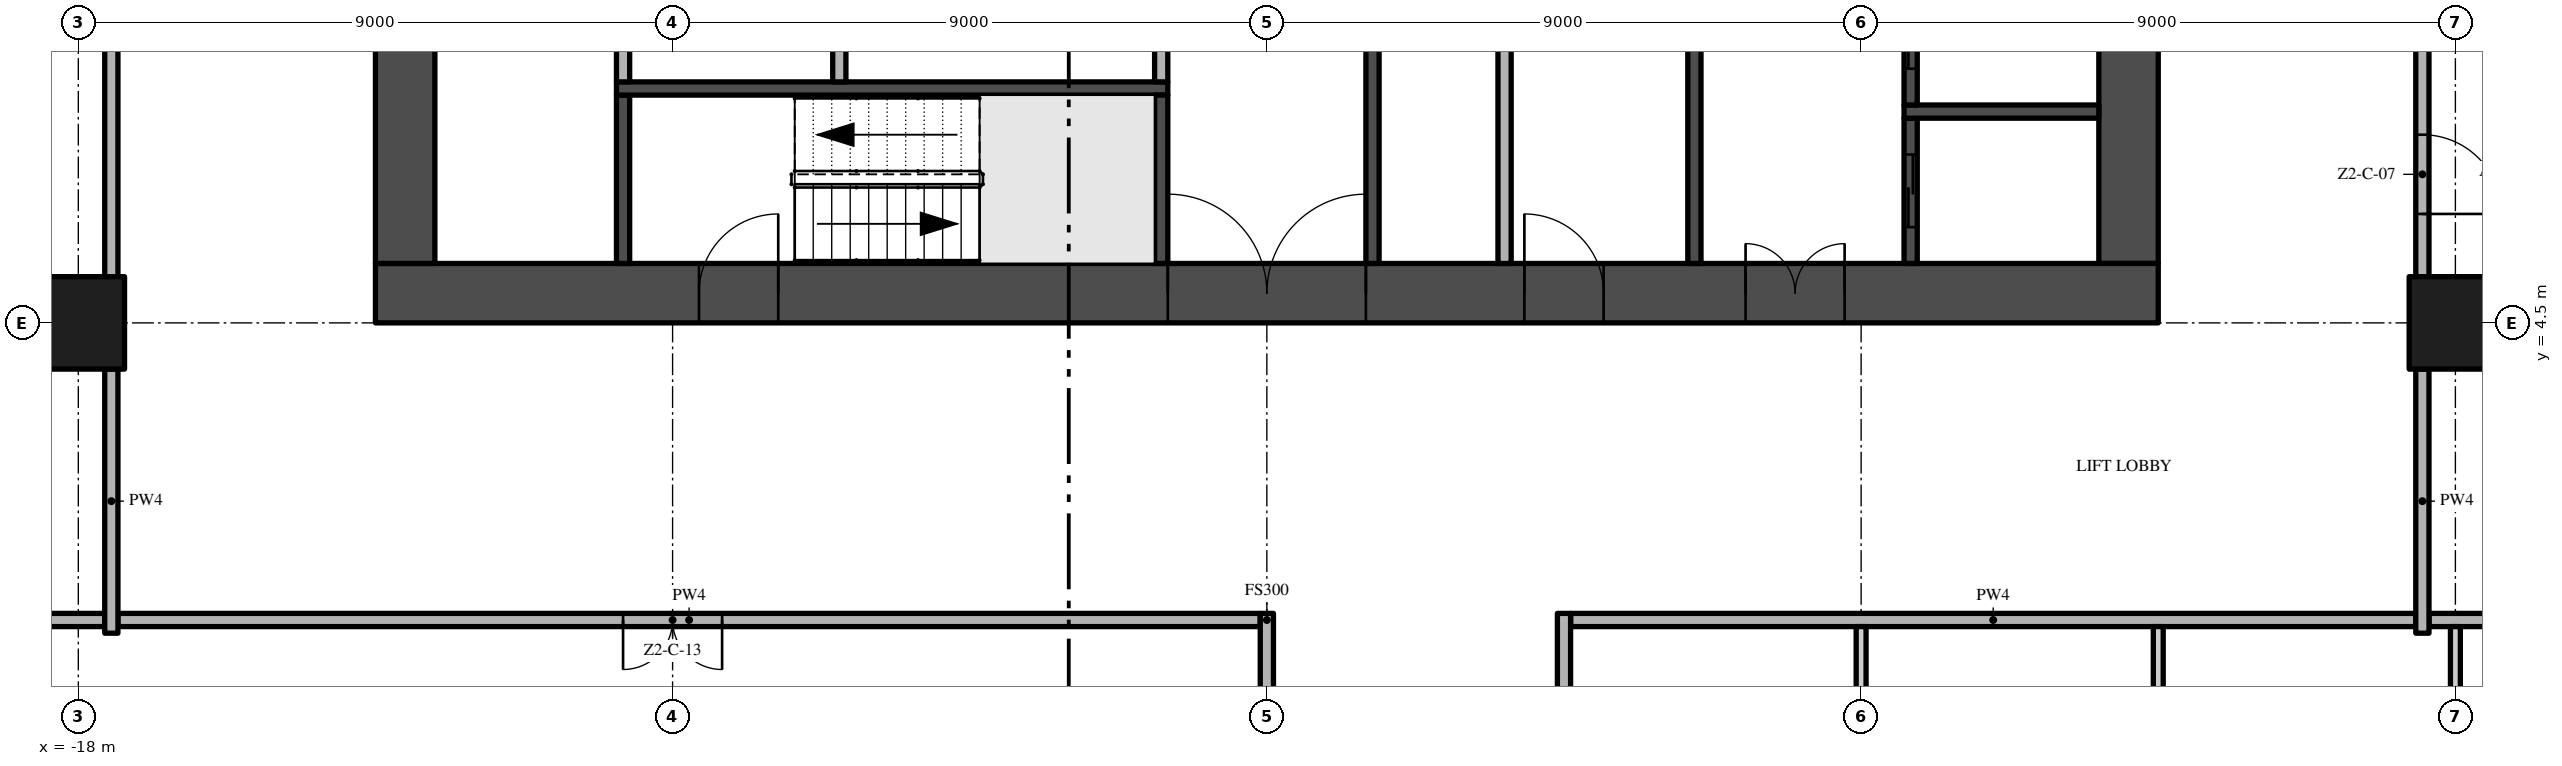
"""IFC4 building model, lengths in metres.
Left out: names, types, materials, properties, quantities, classifications, styles, units other than length and angle.
Written with IfcOpenShell. Run it as: python <this file> out.ifc"""

import sys

from ifc_helpers import new_model, si_unit, direction, frame, frame_2d, origin, origin_2d, place, context, subcontext, project, spatial, rectangle, extrude, element, fill, save


model = new_model("IFC4")
c1 = context("Model", 3, precision=1e-05, world=origin(), true_north=direction((0.0, 1.0)))
c2 = subcontext(c1, "Body", "Model", "MODEL_VIEW")
j1 = project(units=[si_unit("LENGTHUNIT", "METRE"), si_unit("PLANEANGLEUNIT", "RADIAN")], contexts=[c1])
p1 = place(None, origin())
s1 = spatial("IfcSite", under=j1, at=p1, CompositionType="ELEMENT")
p2 = place(p1, origin())
s2 = spatial("IfcBuilding", under=s1, at=p2, CompositionType="ELEMENT")
p3 = place(p2, frame((0.0, 0.0, 96.0)))
s3 = spatial("IfcBuildingStorey", under=s2, at=p3, CompositionType="ELEMENT", Elevation=96.0)
p4 = place(p3, frame((-13.5, 4.95, -0.3), z_axis=(0.0, 0.0, 1.0), x_axis=(1.0, 0.0, 0.0)))
e1 = element("IfcWall", 1, at=p4, inside=s3, PredefinedType="SHEAR", context=c2, shape_type="SweptSolid", body=[
    extrude(rectangle(XDim=27.0, YDim=0.9, at=frame_2d((13.5, 0.0))), origin(), (0.0, 0.0, 1.0), 3.8),
])
p5 = place(p4, frame((12.0, 0.0, 0.3)))
e2 = element("IfcOpeningElement", 2, at=p5, cuts=e1, PredefinedType="OPENING", context=c2, shape_type="SweptSolid", body=[
    extrude(rectangle(XDim=3.0, YDim=2.4, at=frame_2d((1.5, 1.2))), frame((0.0, 0.46, 0.0), z_axis=(0.0, -1.0, 0.0), x_axis=(1.0, 0.0, 0.0)), (0.0, 0.0, 1.0), 0.92),
])
p6 = place(p4, frame((4.9, 0.0, 0.3)))
e3 = element("IfcOpeningElement", 3, at=p6, cuts=e1, PredefinedType="OPENING", context=c2, shape_type="SweptSolid", body=[
    extrude(rectangle(XDim=1.2, YDim=2.2, at=frame_2d((0.6, 1.1))), frame((0.0, 0.46, 0.0), z_axis=(0.0, -1.0, 0.0), x_axis=(1.0, 0.0, 0.0)), (0.0, 0.0, 1.0), 0.92),
])
p7 = place(p4, frame((20.75, 0.0, 0.3)))
e4 = element("IfcOpeningElement", 4, at=p7, cuts=e1, PredefinedType="OPENING", context=c2, shape_type="SweptSolid", body=[
    extrude(rectangle(XDim=1.5, YDim=2.2, at=frame_2d((0.75, 1.1))), frame((0.0, 0.46, 0.0), z_axis=(0.0, -1.0, 0.0), x_axis=(1.0, 0.0, 0.0)), (0.0, 0.0, 1.0), 0.92),
])
p8 = place(p4, frame((17.4, 0.0, 0.3)))
e5 = element("IfcOpeningElement", 5, at=p8, cuts=e1, PredefinedType="OPENING", context=c2, shape_type="SweptSolid", body=[
    extrude(rectangle(XDim=1.2, YDim=2.2, at=frame_2d((0.6, 1.1))), frame((0.0, 0.46, 0.0), z_axis=(0.0, -1.0, 0.0), x_axis=(1.0, 0.0, 0.0)), (0.0, 0.0, 1.0), 0.92),
])
p9 = place(p3, frame((13.05, 5.4, -0.3), z_axis=(0.0, 0.0, 1.0), x_axis=(0.0, 1.0, 0.0)))
e6 = element("IfcWall", 6, at=p9, inside=s3, PredefinedType="SHEAR", context=c2, shape_type="SweptSolid", body=[
    extrude(rectangle(XDim=16.2, YDim=0.9, at=frame_2d((8.1, 0.0))), origin(), (0.0, 0.0, 1.0), 3.8),
])
p10 = place(p9, frame((6.0, 0.0, 0.3)))
e7 = element("IfcOpeningElement", 7, at=p10, cuts=e6, PredefinedType="OPENING", context=c2, shape_type="SweptSolid", body=[
    extrude(rectangle(XDim=1.2, YDim=2.2, at=frame_2d((0.6, 1.1))), frame((0.0, 0.46, 0.0), z_axis=(0.0, -1.0, 0.0), x_axis=(1.0, 0.0, 0.0)), (0.0, 0.0, 1.0), 0.92),
])
p11 = place(p3, frame((-13.05, 21.6, -0.3), z_axis=(0.0, 0.0, 1.0), x_axis=(0.0, -1.0, 0.0)))
e8 = element("IfcWall", 8, at=p11, inside=s3, PredefinedType="SHEAR", context=c2, shape_type="SweptSolid", body=[
    extrude(rectangle(XDim=16.2, YDim=0.9, at=frame_2d((8.1, 0.0))), origin(), (0.0, 0.0, 1.0), 3.8),
])
p12 = place(p11, frame((9.0, 0.0, 0.3)))
e9 = element("IfcOpeningElement", 9, at=p12, cuts=e8, PredefinedType="OPENING", context=c2, shape_type="SweptSolid", body=[
    extrude(rectangle(XDim=1.2, YDim=2.2, at=frame_2d((0.6, 1.1))), frame((0.0, 0.46, 0.0), z_axis=(0.0, -1.0, 0.0), x_axis=(1.0, 0.0, 0.0)), (0.0, 0.0, 1.0), 0.92),
])
for number, where, z_axis, x_axis in (
    (10, (-18.0, 4.5, 0.0), (0.0, 0.0, 1.0), (1.0, 0.0, 0.0)),
    (11, (18.0, 4.5, 0.0), (0.0, 0.0, 1.0), (1.0, 0.0, 0.0)),
):
    element("IfcColumn", number, at=place(p3, frame(where, z_axis=z_axis, x_axis=x_axis)), inside=s3, PredefinedType="COLUMN", context=c2, shape_type="SweptSolid", body=[
        extrude(rectangle(XDim=1.4, YDim=1.4, at=origin_2d()), origin(), (0.0, 0.0, 1.0), 3.5),
    ])
p13 = place(p3, frame((-9.75, 5.4, 0.0), z_axis=(0.0, 0.0, 1.0), x_axis=(0.0, 1.0, 0.0)))
e12 = element("IfcWall", 12, at=p13, inside=s3, PredefinedType="SHEAR", context=c2, shape_type="SweptSolid", body=[
    extrude(rectangle(XDim=2.55, YDim=0.2, at=frame_2d((1.275, 0.0))), origin(), (0.0, 0.0, 1.0), 3.5),
])
p14 = place(p3, frame((-9.85, 8.05, 0.0), z_axis=(0.0, 0.0, 1.0), x_axis=(1.0, 0.0, 0.0)))
e13 = element("IfcWall", 13, at=p14, inside=s3, PredefinedType="SHEAR", context=c2, shape_type="SweptSolid", body=[
    extrude(rectangle(XDim=8.35, YDim=0.2, at=frame_2d((4.175, 0.0))), origin(), (0.0, 0.0, 1.0), 3.5),
])
p15 = place(p3, frame((-9.75, 8.15, 0.0), z_axis=(0.0, 0.0, 1.0), x_axis=(0.0, 1.0, 0.0)))
e14 = element("IfcWall", 14, at=p15, inside=s3, PredefinedType="PARTITIONING", context=c2, shape_type="SweptSolid", body=[
    extrude(rectangle(XDim=1.85, YDim=0.2, at=frame_2d((0.925, 0.0))), origin(), (0.0, 0.0, 1.0), 3.5),
])
p16 = place(p15, frame((0.475, 0.0, 0.0)))
e15 = element("IfcOpeningElement", 15, at=p16, cuts=e14, PredefinedType="OPENING", context=c2, shape_type="SweptSolid", body=[
    extrude(rectangle(XDim=0.9, YDim=2.1, at=frame_2d((0.45, 1.05))), frame((0.0, 0.11, 0.0), z_axis=(0.0, -1.0, 0.0), x_axis=(1.0, 0.0, 0.0)), (0.0, 0.0, 1.0), 0.22),
])
p17 = place(p3, frame((-6.475, 8.15, 0.0), z_axis=(0.0, 0.0, 1.0), x_axis=(0.0, 1.0, 0.0)))
e16 = element("IfcWall", 16, at=p17, inside=s3, PredefinedType="PARTITIONING", context=c2, shape_type="SweptSolid", body=[
    extrude(rectangle(XDim=2.05, YDim=0.2, at=frame_2d((1.025, 0.0))), origin(), (0.0, 0.0, 1.0), 3.5),
])
p18 = place(p17, frame((0.575, 0.0, 0.0)))
e17 = element("IfcOpeningElement", 17, at=p18, cuts=e16, PredefinedType="OPENING", context=c2, shape_type="SweptSolid", body=[
    extrude(rectangle(XDim=0.9, YDim=2.1, at=frame_2d((0.45, 1.05))), frame((0.0, 0.11, 0.0), z_axis=(0.0, -1.0, 0.0), x_axis=(1.0, 0.0, 0.0)), (0.0, 0.0, 1.0), 0.22),
])
p19 = place(p3, frame((-1.6, 5.4, 0.0), z_axis=(0.0, 0.0, 1.0), x_axis=(0.0, 1.0, 0.0)))
e18 = element("IfcWall", 18, at=p19, inside=s3, PredefinedType="SHEAR", context=c2, shape_type="SweptSolid", body=[
    extrude(rectangle(XDim=2.55, YDim=0.2, at=frame_2d((1.275, 0.0))), origin(), (0.0, 0.0, 1.0), 3.5),
])
p20 = place(p3, frame((-1.6, 8.15, 0.0), z_axis=(0.0, 0.0, 1.0), x_axis=(0.0, 1.0, 0.0)))
e19 = element("IfcWall", 19, at=p20, inside=s3, PredefinedType="PARTITIONING", context=c2, shape_type="SweptSolid", body=[
    extrude(rectangle(XDim=2.05, YDim=0.2, at=frame_2d((1.025, 0.0))), origin(), (0.0, 0.0, 1.0), 3.5),
])
p21 = place(p20, frame((0.575, 0.0, 0.0)))
e20 = element("IfcOpeningElement", 20, at=p21, cuts=e19, PredefinedType="OPENING", context=c2, shape_type="SweptSolid", body=[
    extrude(rectangle(XDim=0.9, YDim=2.1, at=frame_2d((0.45, 1.05))), frame((0.0, 0.11, 0.0), z_axis=(0.0, -1.0, 0.0), x_axis=(1.0, 0.0, 0.0)), (0.0, 0.0, 1.0), 0.22),
])
p22 = place(p3, frame((1.6, 13.5, 0.0), z_axis=(0.0, 0.0, 1.0), x_axis=(0.0, -1.0, 0.0)))
e21 = element("IfcWall", 21, at=p22, inside=s3, PredefinedType="SHEAR", context=c2, shape_type="SweptSolid", body=[
    extrude(rectangle(XDim=8.1, YDim=0.2, at=frame_2d((4.05, 0.0))), origin(), (0.0, 0.0, 1.0), 3.5),
])
p23 = place(p22, frame((3.2, 0.0, 0.0)))
e22 = element("IfcOpeningElement", 22, at=p23, cuts=e21, PredefinedType="OPENING", context=c2, shape_type="SweptSolid", body=[
    extrude(rectangle(XDim=0.9, YDim=2.1, at=frame_2d((0.45, 1.05))), frame((0.0, 0.11, 0.0), z_axis=(0.0, -1.0, 0.0), x_axis=(1.0, 0.0, 0.0)), (0.0, 0.0, 1.0), 0.22),
])
p24 = place(p3, frame((3.6, 13.5, 0.0), z_axis=(0.0, 0.0, 1.0), x_axis=(0.0, -1.0, 0.0)))
e23 = element("IfcWall", 23, at=p24, inside=s3, PredefinedType="PARTITIONING", context=c2, shape_type="SweptSolid", body=[
    extrude(rectangle(XDim=8.1, YDim=0.2, at=frame_2d((4.05, 0.0))), origin(), (0.0, 0.0, 1.0), 3.5),
])
p25 = place(p24, frame((3.6, 0.0, 0.0)))
e24 = element("IfcOpeningElement", 24, at=p25, cuts=e23, PredefinedType="OPENING", context=c2, shape_type="SweptSolid", body=[
    extrude(rectangle(XDim=0.9, YDim=2.1, at=frame_2d((0.45, 1.05))), frame((0.0, 0.11, 0.0), z_axis=(0.0, -1.0, 0.0), x_axis=(1.0, 0.0, 0.0)), (0.0, 0.0, 1.0), 0.22),
])
p26 = place(p3, frame((6.475, 5.4, 0.0), z_axis=(0.0, 0.0, 1.0), x_axis=(0.0, 1.0, 0.0)))
e25 = element("IfcWall", 25, at=p26, inside=s3, PredefinedType="SHEAR", context=c2, shape_type="SweptSolid", body=[
    extrude(rectangle(XDim=6.7, YDim=0.2, at=frame_2d((3.35, 0.0))), origin(), (0.0, 0.0, 1.0), 3.5),
])
p27 = place(p3, frame((9.75, 5.4, 0.0), z_axis=(0.0, 0.0, 1.0), x_axis=(0.0, 1.0, 0.0)))
e26 = element("IfcWall", 26, at=p27, inside=s3, PredefinedType="SHEAR", context=c2, shape_type="SweptSolid", body=[
    extrude(rectangle(XDim=2.2, YDim=0.2, at=frame_2d((1.1, 0.0))), origin(), (0.0, 0.0, 1.0), 3.5),
])
p28 = place(p27, frame((0.55, 0.0, 0.0)))
e27 = element("IfcOpeningElement", 27, at=p28, cuts=e26, PredefinedType="OPENING", context=c2, shape_type="SweptSolid", body=[
    extrude(rectangle(XDim=1.1, YDim=2.1, at=frame_2d((0.55, 1.05))), frame((0.0, 0.11, 0.0), z_axis=(0.0, -1.0, 0.0), x_axis=(1.0, 0.0, 0.0)), (0.0, 0.0, 1.0), 0.22),
])
p29 = place(p3, frame((9.65, 7.7, 0.0), z_axis=(0.0, 0.0, 1.0), x_axis=(1.0, 0.0, 0.0)))
e28 = element("IfcWall", 28, at=p29, inside=s3, PredefinedType="SHEAR", context=c2, shape_type="SweptSolid", body=[
    extrude(rectangle(XDim=2.95, YDim=0.2, at=frame_2d((1.475, 0.0))), origin(), (0.0, 0.0, 1.0), 3.5),
])
p30 = place(p3, frame((9.75, 7.8, 0.0), z_axis=(0.0, 0.0, 1.0), x_axis=(0.0, 1.0, 0.0)))
e29 = element("IfcWall", 29, at=p30, inside=s3, PredefinedType="SHEAR", context=c2, shape_type="SweptSolid", body=[
    extrude(rectangle(XDim=2.2, YDim=0.2, at=frame_2d((1.1, 0.0))), origin(), (0.0, 0.0, 1.0), 3.5),
])
p31 = place(p30, frame((0.55, 0.0, 0.0)))
e30 = element("IfcOpeningElement", 30, at=p31, cuts=e29, PredefinedType="OPENING", context=c2, shape_type="SweptSolid", body=[
    extrude(rectangle(XDim=1.1, YDim=2.1, at=frame_2d((0.55, 1.05))), frame((0.0, 0.11, 0.0), z_axis=(0.0, -1.0, 0.0), x_axis=(1.0, 0.0, 0.0)), (0.0, 0.0, 1.0), 0.22),
])
p32 = place(p3, frame((-0.1, 0.0, 0.0), z_axis=(0.0, 0.0, 1.0), x_axis=(-1.0, 0.0, 0.0)))
e31 = element("IfcWall", 31, at=p32, inside=s3, PredefinedType="PARTITIONING", context=c2, shape_type="SweptSolid", body=[
    extrude(rectangle(XDim=17.3, YDim=0.2, at=frame_2d((8.65, 0.0))), origin(), (0.0, 0.0, 1.0), 3.5),
])
p33 = place(p32, frame((8.15, 0.0, 0.0)))
e32 = element("IfcOpeningElement", 32, at=p33, cuts=e31, PredefinedType="OPENING", context=c2, shape_type="SweptSolid", body=[
    extrude(rectangle(XDim=1.5, YDim=2.4, at=frame_2d((0.75, 1.2))), frame((0.0, 0.11, 0.0), z_axis=(0.0, -1.0, 0.0), x_axis=(1.0, 0.0, 0.0)), (0.0, 0.0, 1.0), 0.22),
])
p34 = place(p3, frame((4.6, 0.0, 0.0), z_axis=(0.0, 0.0, 1.0), x_axis=(1.0, 0.0, 0.0)))
e33 = element("IfcWall", 33, at=p34, inside=s3, PredefinedType="PARTITIONING", context=c2, shape_type="SweptSolid", body=[
    extrude(rectangle(XDim=12.8, YDim=0.2, at=frame_2d((6.4, 0.0))), origin(), (0.0, 0.0, 1.0), 3.5),
])
for number, where, z_axis, x_axis in (
    (34, (-26.7, 0.0, 0.0), (0.0, 0.0, 1.0), (1.0, 0.0, 0.0)),
    (35, (17.6, 0.0, 0.0), (0.0, 0.0, 1.0), (1.0, 0.0, 0.0)),
):
    element("IfcWall", number, at=place(p3, frame(where, z_axis=z_axis, x_axis=x_axis)), inside=s3, PredefinedType="PARTITIONING", context=c2, shape_type="SweptSolid", body=[
        extrude(rectangle(XDim=9.1, YDim=0.2, at=frame_2d((4.55, 0.0))), origin(), (0.0, 0.0, 1.0), 3.5),
    ])
p35 = place(p3, frame((-17.5, -0.2, 0.0), z_axis=(0.0, 0.0, 1.0), x_axis=(0.0, 1.0, 0.0)))
e36 = element("IfcWall", 36, at=p35, inside=s3, PredefinedType="PARTITIONING", context=c2, shape_type="SweptSolid", body=[
    extrude(rectangle(XDim=4.0, YDim=0.2, at=frame_2d((2.0, 0.0))), origin(), (0.0, 0.0, 1.0), 3.5),
])
p36 = place(p3, frame((-17.5, 5.2, 0.0), z_axis=(0.0, 0.0, 1.0), x_axis=(0.0, 1.0, 0.0)))
e37 = element("IfcWall", 37, at=p36, inside=s3, PredefinedType="PARTITIONING", context=c2, shape_type="SweptSolid", body=[
    extrude(rectangle(XDim=7.6, YDim=0.2, at=frame_2d((3.8, 0.0))), origin(), (0.0, 0.0, 1.0), 3.5),
])
p37 = place(p3, frame((0.0, -3.8, 0.0), z_axis=(0.0, 0.0, 1.0), x_axis=(0.0, 1.0, 0.0)))
e38 = element("IfcWall", 38, at=p37, inside=s3, PredefinedType="PARTITIONING", context=c2, shape_type="SweptSolid", body=[
    extrude(rectangle(XDim=3.9, YDim=0.2, at=frame_2d((1.95, 0.0))), origin(), (0.0, 0.0, 1.0), 3.5),
])
p38 = place(p3, frame((4.5, 0.1, 0.0), z_axis=(0.0, 0.0, 1.0), x_axis=(0.0, -1.0, 0.0)))
e39 = element("IfcWall", 39, at=p38, inside=s3, PredefinedType="PARTITIONING", context=c2, shape_type="SweptSolid", body=[
    extrude(rectangle(XDim=22.3, YDim=0.2, at=frame_2d((11.15, 0.0))), origin(), (0.0, 0.0, 1.0), 3.5),
])
p39 = place(p38, frame((10.6, 0.0, 0.0)))
e40 = element("IfcOpeningElement", 40, at=p39, cuts=e39, PredefinedType="OPENING", context=c2, shape_type="SweptSolid", body=[
    extrude(rectangle(XDim=1.5, YDim=2.4, at=frame_2d((0.75, 1.2))), frame((0.0, 0.11, 0.0), z_axis=(0.0, -1.0, 0.0), x_axis=(1.0, 0.0, 0.0)), (0.0, 0.0, 1.0), 0.22),
])
p40 = place(p3, frame((9.0, -0.1, 0.0), z_axis=(0.0, 0.0, 1.0), x_axis=(0.0, -1.0, 0.0)))
e41 = element("IfcWall", 41, at=p40, inside=s3, PredefinedType="PARTITIONING", context=c2, shape_type="SweptSolid", body=[
    extrude(rectangle(XDim=3.7, YDim=0.15, at=frame_2d((1.85, 0.0))), origin(), (0.0, 0.0, 1.0), 3.5),
])
p41 = place(p40, frame((2.4, 0.0, 0.0)))
e42 = element("IfcOpeningElement", 42, at=p41, cuts=e41, PredefinedType="OPENING", context=c2, shape_type="SweptSolid", body=[
    extrude(rectangle(XDim=1.0, YDim=2.4, at=frame_2d((0.5, 1.2))), frame((0.0, 0.085, 0.0), z_axis=(0.0, -1.0, 0.0), x_axis=(1.0, 0.0, 0.0)), (0.0, 0.0, 1.0), 0.17),
])
p42 = place(p3, frame((13.5, -8.325, 0.0), z_axis=(0.0, 0.0, 1.0), x_axis=(0.0, 1.0, 0.0)))
e43 = element("IfcWall", 43, at=p42, inside=s3, PredefinedType="PARTITIONING", context=c2, shape_type="SweptSolid", body=[
    extrude(rectangle(XDim=8.225, YDim=0.15, at=frame_2d((4.112, 0.0))), origin(), (0.0, 0.0, 1.0), 3.5),
])
p43 = place(p3, frame((17.5, -0.2, 0.0), z_axis=(0.0, 0.0, 1.0), x_axis=(0.0, 1.0, 0.0)))
e44 = element("IfcWall", 44, at=p43, inside=s3, PredefinedType="PARTITIONING", context=c2, shape_type="SweptSolid", body=[
    extrude(rectangle(XDim=4.0, YDim=0.2, at=frame_2d((2.0, 0.0))), origin(), (0.0, 0.0, 1.0), 3.5),
])
p44 = place(p3, frame((17.5, 12.8, 0.0), z_axis=(0.0, 0.0, 1.0), x_axis=(0.0, -1.0, 0.0)))
e45 = element("IfcWall", 45, at=p44, inside=s3, PredefinedType="PARTITIONING", context=c2, shape_type="SweptSolid", body=[
    extrude(rectangle(XDim=7.6, YDim=0.2, at=frame_2d((3.8, 0.0))), origin(), (0.0, 0.0, 1.0), 3.5),
])
p45 = place(p44, frame((5.45, 0.0, 0.0)))
e46 = element("IfcOpeningElement", 46, at=p45, cuts=e45, PredefinedType="OPENING", context=c2, shape_type="SweptSolid", body=[
    extrude(rectangle(XDim=1.2, YDim=2.4, at=frame_2d((0.6, 1.2))), frame((0.0, 0.11, 0.0), z_axis=(0.0, -1.0, 0.0), x_axis=(1.0, 0.0, 0.0)), (0.0, 0.0, 1.0), 0.22),
])
p46 = place(p3, frame((18.0, -3.8, 0.0), z_axis=(0.0, 0.0, 1.0), x_axis=(0.0, 1.0, 0.0)))
e47 = element("IfcWall", 47, at=p46, inside=s3, PredefinedType="PARTITIONING", context=c2, shape_type="SweptSolid", body=[
    extrude(rectangle(XDim=3.7, YDim=0.15, at=frame_2d((1.85, 0.0))), origin(), (0.0, 0.0, 1.0), 3.5),
])
p47 = place(p5, frame((3.0, 0.0, 0.0), z_axis=(0.0, 0.0, 1.0), x_axis=(-1.0, 0.0, 0.0)))
e48 = element("IfcDoor", 48, at=p47, inside=s3, OperationType="DOUBLE_DOOR_SINGLE_SWING", PredefinedType="DOOR", context=c2, shape_type="SweptSolid", body=[
    extrude(rectangle(XDim=3.0, YDim=2.4, at=frame_2d((1.5, 1.2))), frame((0.0, 0.025, 0.0), z_axis=(0.0, -1.0, 0.0), x_axis=(1.0, 0.0, 0.0)), (0.0, 0.0, 1.0), 0.05),
])
fill(e2, e48)
p48 = place(p6, frame((1.2, 0.0, 0.0), z_axis=(0.0, 0.0, 1.0), x_axis=(-1.0, 0.0, 0.0)))
e49 = element("IfcDoor", 49, at=p48, inside=s3, OperationType="SINGLE_SWING_LEFT", PredefinedType="DOOR", context=c2, shape_type="SweptSolid", body=[
    extrude(rectangle(XDim=1.2, YDim=2.2, at=frame_2d((0.6, 1.1))), frame((0.0, 0.025, 0.0), z_axis=(0.0, -1.0, 0.0), x_axis=(1.0, 0.0, 0.0)), (0.0, 0.0, 1.0), 0.05),
])
fill(e3, e49)
p49 = place(p7, frame((1.5, 0.0, 0.0), z_axis=(0.0, 0.0, 1.0), x_axis=(-1.0, 0.0, 0.0)))
e50 = element("IfcDoor", 50, at=p49, inside=s3, OperationType="DOUBLE_DOOR_SINGLE_SWING", PredefinedType="DOOR", context=c2, shape_type="SweptSolid", body=[
    extrude(rectangle(XDim=1.5, YDim=2.2, at=frame_2d((0.75, 1.1))), frame((0.0, 0.025, 0.0), z_axis=(0.0, -1.0, 0.0), x_axis=(1.0, 0.0, 0.0)), (0.0, 0.0, 1.0), 0.05),
])
fill(e4, e50)
p50 = place(p8, frame((1.2, 0.0, 0.0), z_axis=(0.0, 0.0, 1.0), x_axis=(-1.0, 0.0, 0.0)))
e51 = element("IfcDoor", 51, at=p50, inside=s3, OperationType="SINGLE_SWING_RIGHT", PredefinedType="DOOR", context=c2, shape_type="SweptSolid", body=[
    extrude(rectangle(XDim=1.2, YDim=2.2, at=frame_2d((0.6, 1.1))), frame((0.0, 0.025, 0.0), z_axis=(0.0, -1.0, 0.0), x_axis=(1.0, 0.0, 0.0)), (0.0, 0.0, 1.0), 0.05),
])
fill(e5, e51)
p51 = place(p28, origin())
e52 = element("IfcDoor", 52, at=p51, inside=s3, OperationType="SLIDING_TO_RIGHT", PredefinedType="DOOR", context=c2, shape_type="SweptSolid", body=[
    extrude(rectangle(XDim=1.1, YDim=2.1, at=frame_2d((0.55, 1.05))), frame((0.0, 0.025, 0.0), z_axis=(0.0, -1.0, 0.0), x_axis=(1.0, 0.0, 0.0)), (0.0, 0.0, 1.0), 0.05),
])
fill(e27, e52)
p52 = place(p31, origin())
e53 = element("IfcDoor", 53, at=p52, inside=s3, OperationType="SLIDING_TO_RIGHT", PredefinedType="DOOR", context=c2, shape_type="SweptSolid", body=[
    extrude(rectangle(XDim=1.1, YDim=2.1, at=frame_2d((0.55, 1.05))), frame((0.0, 0.025, 0.0), z_axis=(0.0, -1.0, 0.0), x_axis=(1.0, 0.0, 0.0)), (0.0, 0.0, 1.0), 0.05),
])
fill(e30, e53)
p53 = place(p45, origin())
e54 = element("IfcDoor", 54, at=p53, inside=s3, OperationType="SINGLE_SWING_RIGHT", PredefinedType="DOOR", context=c2, shape_type="SweptSolid", body=[
    extrude(rectangle(XDim=1.2, YDim=2.4, at=frame_2d((0.6, 1.2))), frame((0.0, 0.025, 0.0), z_axis=(0.0, -1.0, 0.0), x_axis=(1.0, 0.0, 0.0)), (0.0, 0.0, 1.0), 0.05),
])
fill(e46, e54)
p54 = place(p33, origin())
e55 = element("IfcDoor", 55, at=p54, inside=s3, OperationType="DOUBLE_DOOR_SINGLE_SWING", PredefinedType="DOOR", context=c2, shape_type="SweptSolid", body=[
    extrude(rectangle(XDim=1.5, YDim=2.4, at=frame_2d((0.75, 1.2))), frame((0.0, 0.025, 0.0), z_axis=(0.0, -1.0, 0.0), x_axis=(1.0, 0.0, 0.0)), (0.0, 0.0, 1.0), 0.05),
])
fill(e32, e55)
save(model, sys.argv[1])
